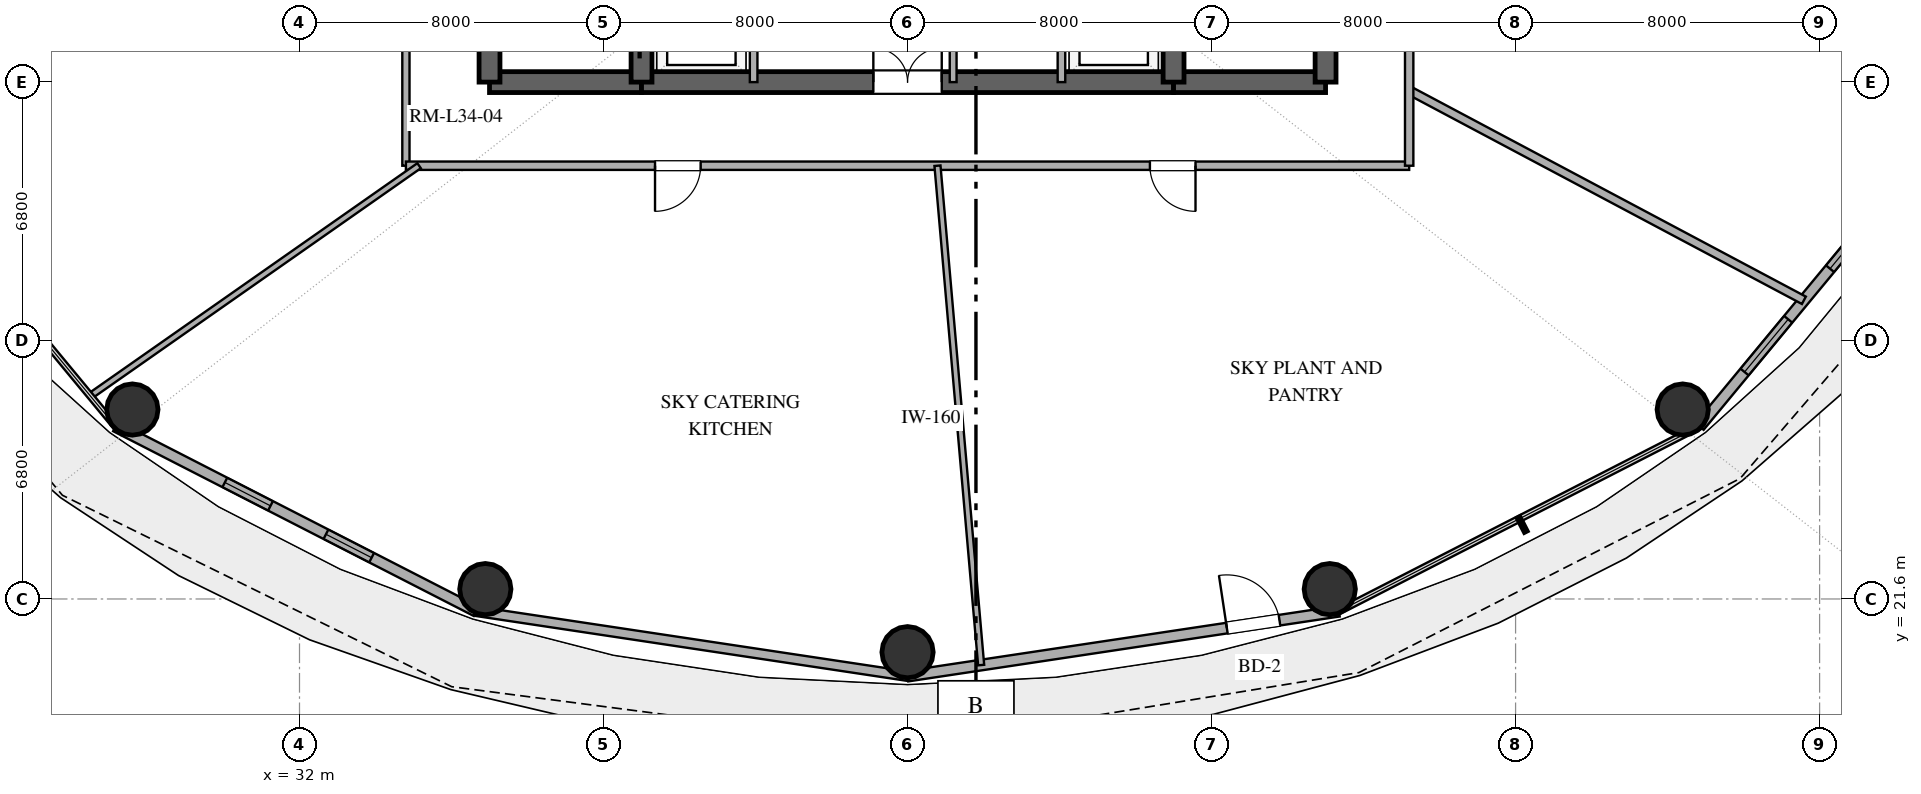
"""IFC4 building model, lengths in metres.
Left out: names, types, materials, properties, quantities, classifications, styles, units other than length and angle.
Written with IfcOpenShell. Run it as: python <this file> out.ifc"""

import sys

from ifc_helpers import new_model, si_unit, direction, frame, frame_2d, origin, origin_2d, place, context, subcontext, project, spatial, rectangle, hollow_circle, extrude, element, fill, save


model = new_model("IFC4")
c1 = context("Model", 3, precision=1e-05, world=origin(), true_north=direction((0.0, 1.0)))
c2 = subcontext(c1, "Body", "Model", "MODEL_VIEW")
j1 = project(units=[si_unit("LENGTHUNIT", "METRE"), si_unit("PLANEANGLEUNIT", "RADIAN")], contexts=[c1])
p1 = place(None, origin())
s1 = spatial("IfcSite", under=j1, at=p1, CompositionType="ELEMENT")
p2 = place(p1, origin())
s2 = spatial("IfcBuilding", under=s1, at=p2, CompositionType="ELEMENT")
p3 = place(p2, frame((0.0, 0.0, 134.4)))
s3 = spatial("IfcBuildingStorey", under=s2, at=p3, CompositionType="ELEMENT", Elevation=134.4)
p4 = place(p3, frame((37.0, 35.2, 0.0), z_axis=(0.0, 0.0, 1.0), x_axis=(1.0, 0.0, 0.0)))
e1 = element("IfcWall", 1, at=p4, inside=s3, PredefinedType="SHEAR", context=c2, shape_type="SweptSolid", body=[
    extrude(rectangle(XDim=4.0, YDim=0.55, at=frame_2d((2.0, 0.0))), origin(), (0.0, 0.0, 1.0), 5.05),
])
p5 = place(p3, frame((41.0, 35.2, 0.0), z_axis=(0.0, 0.0, 1.0), x_axis=(1.0, 0.0, 0.0)))
e2 = element("IfcWall", 2, at=p5, inside=s3, PredefinedType="SHEAR", context=c2, shape_type="SweptSolid", body=[
    extrude(rectangle(XDim=14.0, YDim=0.55, at=frame_2d((7.0, 0.0))), origin(), (0.0, 0.0, 1.0), 5.05),
])
p6 = place(p5, frame((6.1, 0.0, 0.0)))
e3 = element("IfcOpeningElement", 3, at=p6, cuts=e2, PredefinedType="OPENING", context=c2, shape_type="SweptSolid", body=[
    extrude(rectangle(XDim=1.8, YDim=2.25, at=frame_2d((0.9, 1.125))), frame((0.0, 0.285, 0.0), z_axis=(0.0, -1.0, 0.0), x_axis=(1.0, 0.0, 0.0)), (0.0, 0.0, 1.0), 0.57),
])
p7 = place(p3, frame((55.0, 35.2, 0.0), z_axis=(0.0, 0.0, 1.0), x_axis=(1.0, 0.0, 0.0)))
e4 = element("IfcWall", 4, at=p7, inside=s3, PredefinedType="SHEAR", context=c2, shape_type="SweptSolid", body=[
    extrude(rectangle(XDim=4.0, YDim=0.55, at=frame_2d((2.0, 0.0))), origin(), (0.0, 0.0, 1.0), 5.05),
])
p8 = place(p3, frame((37.0, 35.2, 0.0), z_axis=(0.0, 0.0, 1.0), x_axis=(0.0, 1.0, 0.0)))
e5 = element("IfcWall", 5, at=p8, inside=s3, PredefinedType="SHEAR", context=c2, shape_type="SweptSolid", body=[
    extrude(rectangle(XDim=13.6, YDim=0.55, at=frame_2d((6.8, 0.0))), origin(), (0.0, 0.0, 1.0), 5.05),
])
p9 = place(p8, frame((1.5, 0.0, 0.0)))
e6 = element("IfcOpeningElement", 6, at=p9, cuts=e5, PredefinedType="OPENING", context=c2, shape_type="SweptSolid", body=[
    extrude(rectangle(XDim=1.2, YDim=2.15, at=frame_2d((0.6, 1.075))), frame((0.0, 0.285, 0.0), z_axis=(0.0, -1.0, 0.0), x_axis=(1.0, 0.0, 0.0)), (0.0, 0.0, 1.0), 0.57),
])
p10 = place(p3, frame((59.0, 35.2, 0.0), z_axis=(0.0, 0.0, 1.0), x_axis=(0.0, 1.0, 0.0)))
e7 = element("IfcWall", 7, at=p10, inside=s3, PredefinedType="SHEAR", context=c2, shape_type="SweptSolid", body=[
    extrude(rectangle(XDim=13.6, YDim=0.55, at=frame_2d((6.8, 0.0))), origin(), (0.0, 0.0, 1.0), 5.05),
])
p11 = place(p10, frame((1.5, 0.0, 0.0)))
e8 = element("IfcOpeningElement", 8, at=p11, cuts=e7, PredefinedType="OPENING", context=c2, shape_type="SweptSolid", body=[
    extrude(rectangle(XDim=1.2, YDim=2.15, at=frame_2d((0.6, 1.075))), frame((0.0, 0.285, 0.0), z_axis=(0.0, -1.0, 0.0), x_axis=(1.0, 0.0, 0.0)), (0.0, 0.0, 1.0), 0.57),
])
p12 = place(p3, frame((41.0, 35.2, 0.0), z_axis=(0.0, 0.0, 1.0), x_axis=(0.0, 1.0, 0.0)))
e9 = element("IfcWall", 9, at=p12, inside=s3, PredefinedType="SHEAR", context=c2, shape_type="SweptSolid", body=[
    extrude(rectangle(XDim=13.6, YDim=0.55, at=frame_2d((6.8, 0.0))), origin(), (0.0, 0.0, 1.0), 5.05),
])
p13 = place(p12, frame((1.15, 0.0, 0.0)))
e10 = element("IfcOpeningElement", 10, at=p13, cuts=e9, PredefinedType="OPENING", context=c2, shape_type="SweptSolid", body=[
    extrude(rectangle(XDim=1.1, YDim=2.2, at=frame_2d((0.55, 1.1))), frame((0.0, 0.285, 0.0), z_axis=(0.0, -1.0, 0.0), x_axis=(1.0, 0.0, 0.0)), (0.0, 0.0, 1.0), 0.57),
])
p14 = place(p3, frame((55.0, 35.2, 0.0), z_axis=(0.0, 0.0, 1.0), x_axis=(0.0, 1.0, 0.0)))
e11 = element("IfcWall", 11, at=p14, inside=s3, PredefinedType="SHEAR", context=c2, shape_type="SweptSolid", body=[
    extrude(rectangle(XDim=13.6, YDim=0.55, at=frame_2d((6.8, 0.0))), origin(), (0.0, 0.0, 1.0), 5.05),
])
p15 = place(p14, frame((1.15, 0.0, 0.0)))
e12 = element("IfcOpeningElement", 12, at=p15, cuts=e11, PredefinedType="OPENING", context=c2, shape_type="SweptSolid", body=[
    extrude(rectangle(XDim=1.1, YDim=2.2, at=frame_2d((0.55, 1.1))), frame((0.0, 0.285, 0.0), z_axis=(0.0, -1.0, 0.0), x_axis=(1.0, 0.0, 0.0)), (0.0, 0.0, 1.0), 0.57),
])
for number, where, z_axis, x_axis in (
    (13, (27.602, 26.585, 0.0), (0.0, 0.0, 1.0), (1.0, 0.0, 0.0)),
    (14, (36.89, 21.859, 0.0), (0.0, 0.0, 1.0), (1.0, 0.0, 0.0)),
    (15, (48.0, 20.2, 0.0), (0.0, 0.0, 1.0), (1.0, 0.0, 0.0)),
    (16, (59.11, 21.859, 0.0), (0.0, 0.0, 1.0), (1.0, 0.0, 0.0)),
    (17, (68.398, 26.585, 0.0), (0.0, 0.0, 1.0), (1.0, 0.0, 0.0)),
):
    element("IfcColumn", number, at=place(p3, frame(where, z_axis=z_axis, x_axis=x_axis)), inside=s3, PredefinedType="COLUMN", context=c2, shape_type="SweptSolid", body=[
        extrude(hollow_circle(Radius=0.675, WallThickness=0.036, at=origin_2d()), origin(), (0.0, 0.0, 1.0), 5.05),
    ])
p16 = place(p3, frame((27.16, 26.14, 0.0), z_axis=(0.0, 0.0, 1.0), x_axis=(0.889959505023, -0.45603955905, 0.0)))
e18 = element("IfcWall", 18, at=p16, inside=s3, PredefinedType="SOLIDWALL", context=c2, shape_type="SweptSolid", body=[
    extrude(rectangle(XDim=10.662, YDim=0.28, at=frame_2d((5.331, 0.0))), origin(), (0.0, 0.0, 1.0), 5.05),
])
p17 = place(p16, frame((3.231, 0.0, 0.85)))
e19 = element("IfcOpeningElement", 19, at=p17, cuts=e18, PredefinedType="OPENING", context=c2, shape_type="SweptSolid", body=[
    extrude(rectangle(XDim=1.35, YDim=1.8, at=frame_2d((0.675, 0.9))), frame((0.0, 0.15, 0.0), z_axis=(0.0, -1.0, 0.0), x_axis=(1.0, 0.0, 0.0)), (0.0, 0.0, 1.0), 0.3),
])
p18 = place(p16, frame((6.221, 0.0, 0.85)))
e20 = element("IfcOpeningElement", 20, at=p18, cuts=e18, PredefinedType="OPENING", context=c2, shape_type="SweptSolid", body=[
    extrude(rectangle(XDim=1.35, YDim=1.8, at=frame_2d((0.675, 0.9))), frame((0.0, 0.15, 0.0), z_axis=(0.0, -1.0, 0.0), x_axis=(1.0, 0.0, 0.0)), (0.0, 0.0, 1.0), 0.3),
])
p19 = place(p3, frame((36.649, 21.277, 0.0), z_axis=(0.0, 0.0, 1.0), x_axis=(0.988877774656, -0.148730450117, 0.0)))
e21 = element("IfcWall", 21, at=p19, inside=s3, PredefinedType="SOLIDWALL", context=c2, shape_type="SweptSolid", body=[
    extrude(rectangle(XDim=11.479, YDim=0.25, at=frame_2d((5.74, 0.0))), origin(), (0.0, 0.0, 1.0), 5.05),
])
p20 = place(p3, frame((48.0, 19.57, 0.0), z_axis=(0.0, 0.0, 1.0), x_axis=(0.988877774656, 0.148730450117, 0.0)))
e22 = element("IfcWall", 22, at=p20, inside=s3, PredefinedType="SOLIDWALL", context=c2, shape_type="SweptSolid", body=[
    extrude(rectangle(XDim=11.479, YDim=0.28, at=frame_2d((5.74, 0.0))), origin(), (0.0, 0.0, 1.0), 5.05),
])
p21 = place(p20, frame((8.497, 0.0, 0.0)))
e23 = element("IfcOpeningElement", 23, at=p21, cuts=e22, PredefinedType="OPENING", context=c2, shape_type="SweptSolid", body=[
    extrude(rectangle(XDim=1.4, YDim=2.2, at=frame_2d((0.7, 1.1))), frame((0.0, 0.15, 0.0), z_axis=(0.0, -1.0, 0.0), x_axis=(1.0, 0.0, 0.0)), (0.0, 0.0, 1.0), 0.3),
])
p22 = place(p3, frame((68.84, 26.14, 0.0), z_axis=(0.0, 0.0, 1.0), x_axis=(0.637505817448, 0.770445541696, 0.0)))
e24 = element("IfcWall", 24, at=p22, inside=s3, PredefinedType="SOLIDWALL", context=c2, shape_type="SweptSolid", body=[
    extrude(rectangle(XDim=9.445, YDim=0.28, at=frame_2d((4.723, 0.0))), origin(), (0.0, 0.0, 1.0), 5.05),
])
p23 = place(p22, frame((1.86, 0.0, 0.85)))
e25 = element("IfcOpeningElement", 25, at=p23, cuts=e24, PredefinedType="OPENING", context=c2, shape_type="SweptSolid", body=[
    extrude(rectangle(XDim=1.8, YDim=2.2, at=frame_2d((0.9, 1.1))), frame((0.0, 0.15, 0.0), z_axis=(0.0, -1.0, 0.0), x_axis=(1.0, 0.0, 0.0)), (0.0, 0.0, 1.0), 0.3),
])
p24 = place(p22, frame((5.388, 0.0, 0.85)))
e26 = element("IfcOpeningElement", 26, at=p24, cuts=e24, PredefinedType="OPENING", context=c2, shape_type="SweptSolid", body=[
    extrude(rectangle(XDim=1.65, YDim=2.0, at=frame_2d((0.825, 1.0))), frame((0.0, 0.15, 0.0), z_axis=(0.0, -1.0, 0.0), x_axis=(1.0, 0.0, 0.0)), (0.0, 0.0, 1.0), 0.3),
])
for number, where, z_axis, x_axis in (
    (27, (43.95, 35.2, 0.0), (0.0, 0.0, 1.0), (0.0, 1.0, 0.0)),
    (28, (52.05, 35.2, 0.0), (0.0, 0.0, 1.0), (0.0, 1.0, 0.0)),
):
    element("IfcWall", number, at=place(p3, frame(where, z_axis=z_axis, x_axis=x_axis)), inside=s3, PredefinedType="SOLIDWALL", context=c2, shape_type="SweptSolid", body=[
        extrude(rectangle(XDim=3.2, YDim=0.2, at=frame_2d((1.6, 0.0))), origin(), (0.0, 0.0, 1.0), 4.35),
    ])
p25 = place(p3, frame((49.2, 35.2, 0.0), z_axis=(0.0, 0.0, 1.0), x_axis=(0.0, 1.0, 0.0)))
e29 = element("IfcWall", 29, at=p25, inside=s3, PredefinedType="PLUMBINGWALL", context=c2, shape_type="SweptSolid", body=[
    extrude(rectangle(XDim=3.2, YDim=0.18, at=frame_2d((1.6, 0.0))), origin(), (0.0, 0.0, 1.0), 4.35),
])
p26 = place(p25, frame((1.15, 0.0, 0.0)))
e30 = element("IfcOpeningElement", 30, at=p26, cuts=e29, PredefinedType="OPENING", context=c2, shape_type="SweptSolid", body=[
    extrude(rectangle(XDim=0.9, YDim=2.1, at=frame_2d((0.45, 1.05))), frame((0.0, 0.1, 0.0), z_axis=(0.0, -1.0, 0.0), x_axis=(1.0, 0.0, 0.0)), (0.0, 0.0, 1.0), 0.2),
])
p27 = place(p3, frame((34.8, 33.0, 0.0), z_axis=(0.0, 0.0, 1.0), x_axis=(0.0, 1.0, 0.0)))
e31 = element("IfcWall", 31, at=p27, inside=s3, PredefinedType="PARTITIONING", context=c2, shape_type="SweptSolid", body=[
    extrude(rectangle(XDim=18.0, YDim=0.19, at=frame_2d((9.0, 0.0))), origin(), (0.0, 0.0, 1.0), 4.35),
])
p28 = place(p27, frame((8.4, 0.0, 0.0)))
e32 = element("IfcOpeningElement", 32, at=p28, cuts=e31, PredefinedType="OPENING", context=c2, shape_type="SweptSolid", body=[
    extrude(rectangle(XDim=1.2, YDim=2.25, at=frame_2d((0.6, 1.125))), frame((0.0, 0.105, 0.0), z_axis=(0.0, -1.0, 0.0), x_axis=(1.0, 0.0, 0.0)), (0.0, 0.0, 1.0), 0.21),
])
p29 = place(p3, frame((61.2, 33.0, 0.0), z_axis=(0.0, 0.0, 1.0), x_axis=(-1.0, 0.0, 0.0)))
e33 = element("IfcWall", 33, at=p29, inside=s3, PredefinedType="SOLIDWALL", context=c2, shape_type="SweptSolid", body=[
    extrude(rectangle(XDim=26.4, YDim=0.22, at=frame_2d((13.2, 0.0))), origin(), (0.0, 0.0, 1.0), 4.35),
])
p30 = place(p29, frame((18.645, 0.0, 0.0)))
e34 = element("IfcOpeningElement", 34, at=p30, cuts=e33, PredefinedType="OPENING", context=c2, shape_type="SweptSolid", body=[
    extrude(rectangle(XDim=1.2, YDim=2.25, at=frame_2d((0.6, 1.125))), frame((0.0, 0.12, 0.0), z_axis=(0.0, -1.0, 0.0), x_axis=(1.0, 0.0, 0.0)), (0.0, 0.0, 1.0), 0.24),
])
p31 = place(p29, frame((5.622, 0.0, 0.0)))
e35 = element("IfcOpeningElement", 35, at=p31, cuts=e33, PredefinedType="OPENING", context=c2, shape_type="SweptSolid", body=[
    extrude(rectangle(XDim=1.2, YDim=2.25, at=frame_2d((0.6, 1.125))), frame((0.0, 0.12, 0.0), z_axis=(0.0, -1.0, 0.0), x_axis=(1.0, 0.0, 0.0)), (0.0, 0.0, 1.0), 0.24),
])
p32 = place(p3, frame((49.937, 19.861, 0.0), z_axis=(0.0, 0.0, 1.0), x_axis=(-0.087168787326, 0.996193556753, 0.0)))
e36 = element("IfcWall", 36, at=p32, inside=s3, PredefinedType="PLUMBINGWALL", context=c2, shape_type="SweptSolid", body=[
    extrude(rectangle(XDim=13.189, YDim=0.16, at=frame_2d((6.594, 0.0))), origin(), (0.0, 0.0, 1.0), 4.35),
])
p33 = place(p3, frame((61.2, 34.981, 0.0), z_axis=(0.0, 0.0, 1.0), x_axis=(0.88294798911, -0.469470817545, 0.0)))
e37 = element("IfcWall", 37, at=p33, inside=s3, PredefinedType="SOLIDWALL", context=c2, shape_type="SweptSolid", body=[
    extrude(rectangle(XDim=11.764, YDim=0.22, at=frame_2d((5.882, 0.0))), origin(), (0.0, 0.0, 1.0), 4.35),
])
p34 = place(p3, frame((26.496, 26.942, 0.0), z_axis=(0.0, 0.0, 1.0), x_axis=(0.819150459782, 0.573578699255, 0.0)))
e38 = element("IfcWall", 38, at=p34, inside=s3, PredefinedType="PLUMBINGWALL", context=c2, shape_type="SweptSolid", body=[
    extrude(rectangle(XDim=10.561, YDim=0.16, at=frame_2d((5.281, 0.0))), origin(), (0.0, 0.0, 1.0), 4.35),
])
p35 = place(p3, frame((61.2, 51.0, 0.0), z_axis=(0.0, 0.0, 1.0), x_axis=(0.0, -1.0, 0.0)))
e39 = element("IfcWall", 39, at=p35, inside=s3, PredefinedType="SOLIDWALL", context=c2, shape_type="SweptSolid", body=[
    extrude(rectangle(XDim=18.0, YDim=0.22, at=frame_2d((9.0, 0.0))), origin(), (0.0, 0.0, 1.0), 4.35),
])
p36 = place(p35, frame((11.911, 0.0, 0.0)))
e40 = element("IfcOpeningElement", 40, at=p36, cuts=e39, PredefinedType="OPENING", context=c2, shape_type="SweptSolid", body=[
    extrude(rectangle(XDim=1.2, YDim=2.25, at=frame_2d((0.6, 1.125))), frame((0.0, 0.12, 0.0), z_axis=(0.0, -1.0, 0.0), x_axis=(1.0, 0.0, 0.0)), (0.0, 0.0, 1.0), 0.24),
])
p37 = place(p35, frame((5.179, 0.0, 0.0)))
e41 = element("IfcOpeningElement", 41, at=p37, cuts=e39, PredefinedType="OPENING", context=c2, shape_type="SweptSolid", body=[
    extrude(rectangle(XDim=1.2, YDim=2.25, at=frame_2d((0.6, 1.125))), frame((0.0, 0.12, 0.0), z_axis=(0.0, -1.0, 0.0), x_axis=(1.0, 0.0, 0.0)), (0.0, 0.0, 1.0), 0.24),
])
p38 = place(p17, origin())
e42 = element("IfcWindow", 42, at=p38, inside=s3, PartitioningType="SINGLE_PANEL", PredefinedType="WINDOW", context=c2, shape_type="SweptSolid", body=[
    extrude(rectangle(XDim=1.35, YDim=1.8, at=frame_2d((0.675, 0.9))), frame((0.0, 0.03, 0.0), z_axis=(0.0, -1.0, 0.0), x_axis=(1.0, 0.0, 0.0)), (0.0, 0.0, 1.0), 0.06),
])
fill(e19, e42)
p39 = place(p18, origin())
e43 = element("IfcWindow", 43, at=p39, inside=s3, PartitioningType="SINGLE_PANEL", PredefinedType="WINDOW", context=c2, shape_type="SweptSolid", body=[
    extrude(rectangle(XDim=1.35, YDim=1.8, at=frame_2d((0.675, 0.9))), frame((0.0, 0.03, 0.0), z_axis=(0.0, -1.0, 0.0), x_axis=(1.0, 0.0, 0.0)), (0.0, 0.0, 1.0), 0.06),
])
fill(e20, e43)
p40 = place(p21, origin())
e44 = element("IfcDoor", 44, at=p40, inside=s3, OperationType="SINGLE_SWING_LEFT", PredefinedType="DOOR", context=c2, shape_type="SweptSolid", body=[
    extrude(rectangle(XDim=1.4, YDim=2.2, at=frame_2d((0.7, 1.1))), frame((0.0, 0.025, 0.0), z_axis=(0.0, -1.0, 0.0), x_axis=(1.0, 0.0, 0.0)), (0.0, 0.0, 1.0), 0.05),
])
fill(e23, e44)
p41 = place(p23, origin())
e45 = element("IfcWindow", 45, at=p41, inside=s3, PartitioningType="SINGLE_PANEL", PredefinedType="WINDOW", context=c2, shape_type="SweptSolid", body=[
    extrude(rectangle(XDim=1.8, YDim=2.2, at=frame_2d((0.9, 1.1))), frame((0.0, 0.03, 0.0), z_axis=(0.0, -1.0, 0.0), x_axis=(1.0, 0.0, 0.0)), (0.0, 0.0, 1.0), 0.06),
])
fill(e25, e45)
p42 = place(p24, origin())
e46 = element("IfcWindow", 46, at=p42, inside=s3, PartitioningType="SINGLE_PANEL", PredefinedType="WINDOW", context=c2, shape_type="SweptSolid", body=[
    extrude(rectangle(XDim=1.65, YDim=2.0, at=frame_2d((0.825, 1.0))), frame((0.0, 0.03, 0.0), z_axis=(0.0, -1.0, 0.0), x_axis=(1.0, 0.0, 0.0)), (0.0, 0.0, 1.0), 0.06),
])
fill(e26, e46)
p43 = place(p6, origin())
e47 = element("IfcDoor", 47, at=p43, inside=s3, OperationType="DOUBLE_DOOR_SINGLE_SWING", PredefinedType="DOOR", context=c2, shape_type="SweptSolid", body=[
    extrude(rectangle(XDim=1.8, YDim=2.25, at=frame_2d((0.9, 1.125))), frame((0.0, 0.025, 0.0), z_axis=(0.0, -1.0, 0.0), x_axis=(1.0, 0.0, 0.0)), (0.0, 0.0, 1.0), 0.05),
])
fill(e3, e47)
p44 = place(p30, origin())
e48 = element("IfcDoor", 48, at=p44, inside=s3, OperationType="SINGLE_SWING_RIGHT", PredefinedType="DOOR", context=c2, shape_type="SweptSolid", body=[
    extrude(rectangle(XDim=1.2, YDim=2.25, at=frame_2d((0.6, 1.125))), frame((0.0, 0.025, 0.0), z_axis=(0.0, -1.0, 0.0), x_axis=(1.0, 0.0, 0.0)), (0.0, 0.0, 1.0), 0.05),
])
fill(e34, e48)
p45 = place(p31, origin())
e49 = element("IfcDoor", 49, at=p45, inside=s3, OperationType="SINGLE_SWING_LEFT", PredefinedType="DOOR", context=c2, shape_type="SweptSolid", body=[
    extrude(rectangle(XDim=1.2, YDim=2.25, at=frame_2d((0.6, 1.125))), frame((0.0, 0.025, 0.0), z_axis=(0.0, -1.0, 0.0), x_axis=(1.0, 0.0, 0.0)), (0.0, 0.0, 1.0), 0.05),
])
fill(e35, e49)
save(model, sys.argv[1])
